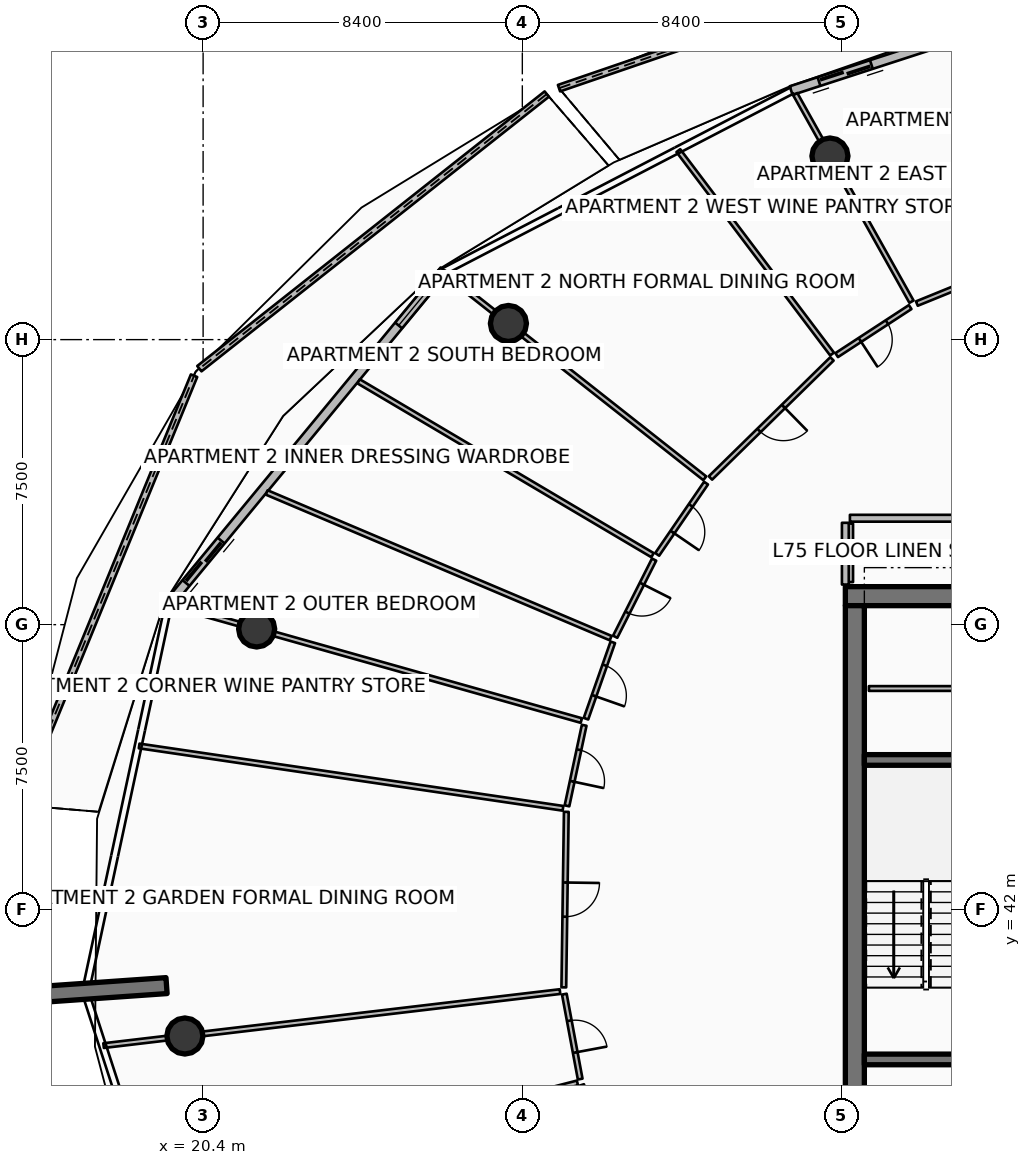
"""IFC4 building model, lengths in metres.
Left out: names, types, materials, properties, quantities, classifications, styles, units other than length and angle.
Written with IfcOpenShell. Run it as: python <this file> out.ifc"""

import sys

from ifc_helpers import new_model, si_unit, direction, frame, frame_2d, origin, origin_2d, place, context, subcontext, project, spatial, polyline, rectangle, circle, outline, extrude, element, fill, save


model = new_model("IFC4")
c1 = context("Model", 3, precision=1e-05, world=origin(), true_north=direction((0.0, 1.0)))
c2 = subcontext(c1, "Body", "Model", "MODEL_VIEW")
j1 = project(units=[si_unit("LENGTHUNIT", "METRE"), si_unit("PLANEANGLEUNIT", "RADIAN")], contexts=[c1])
p1 = place(None, origin())
s1 = spatial("IfcSite", under=j1, at=p1, CompositionType="ELEMENT")
p2 = place(p1, origin())
s2 = spatial("IfcBuilding", under=s1, at=p2, CompositionType="ELEMENT")
p3 = place(p2, frame((0.0, 0.0, 298.3)))
s3 = spatial("IfcBuildingStorey", under=s2, at=p3, CompositionType="ELEMENT", Elevation=298.3)
p4 = place(p3, frame((37.3, 50.25, 0.0), z_axis=(0.0, 0.0, 1.0), x_axis=(1.0, 0.0, 0.0)))
e1 = element("IfcWall", 1, at=p4, inside=s3, PredefinedType="SHEAR", context=c2, shape_type="SweptSolid", body=[
    extrude(rectangle(XDim=9.6, YDim=0.5, at=frame_2d((4.8, 0.0))), origin(), (0.0, 0.0, 1.0), 3.85),
])
p5 = place(p3, frame((37.55, 34.0, 0.0), z_axis=(0.0, 0.0, 1.0), x_axis=(0.0, 1.0, 0.0)))
e2 = element("IfcWall", 2, at=p5, inside=s3, PredefinedType="SHEAR", context=c2, shape_type="SweptSolid", body=[
    extrude(rectangle(XDim=16.0, YDim=0.5, at=frame_2d((8.0, 0.0))), origin(), (0.0, 0.0, 1.0), 3.85),
])
for number, where, z_axis, x_axis in (
    (3, (37.8, 38.06, 0.0), (0.0, 0.0, 1.0), (1.0, 0.0, 0.0)),
    (4, (37.8, 45.94, 0.0), (0.0, 0.0, 1.0), (1.0, 0.0, 0.0)),
):
    element("IfcWall", number, at=place(p3, frame(where, z_axis=z_axis, x_axis=x_axis)), inside=s3, PredefinedType="SHEAR", context=c2, shape_type="SweptSolid", body=[
        extrude(rectangle(XDim=3.5, YDim=0.28, at=frame_2d((1.75, 0.0))), origin(), (0.0, 0.0, 1.0), 3.85),
    ])
p6 = place(p3, frame((19.438, 40.003, 0.0), z_axis=(0.0, 0.0, 1.0), x_axis=(-0.997563824095, -0.069759707979, 0.0)))
e5 = element("IfcWall", 5, at=p6, inside=s3, PredefinedType="SOLIDWALL", context=c2, shape_type="SweptSolid", body=[
    extrude(rectangle(XDim=3.5, YDim=0.42, at=frame_2d((1.75, 0.0))), origin(), (0.0, 0.0, 1.0), 3.85),
])
for number, where, z_axis, x_axis in (
    (6, (36.895, 61.83, 0.0), (0.0, 0.0, 1.0), (1.0, 0.0, 0.0)),
    (7, (28.434, 57.425, 0.0), (0.0, 0.0, 1.0), (1.0, 0.0, 0.0)),
    (8, (21.809, 49.387, 0.0), (0.0, 0.0, 1.0), (1.0, 0.0, 0.0)),
    (9, (19.92, 38.677, 0.0), (0.0, 0.0, 1.0), (1.0, 0.0, 0.0)),
):
    element("IfcColumn", number, at=place(p3, frame(where, z_axis=z_axis, x_axis=x_axis)), inside=s3, PredefinedType="COLUMN", context=c2, shape_type="SweptSolid", body=[
        extrude(circle(Radius=0.475, at=origin_2d()), origin(), (0.0, 0.0, 1.0), 3.59),
    ])
p7 = place(p3, frame((39.74, 67.034, 0.0), z_axis=(0.0, 0.0, 1.0), x_axis=(-0.945994037051, -0.32418402469, 0.0)))
e10 = element("IfcWall", 10, at=p7, inside=s3, PredefinedType="PARAPET", context=c2, shape_type="SweptSolid", body=[
    extrude(outline(polyline([(0.0, 0.0), (10.544, 0.0), (10.544, 1.747), (5.272, 1.562), (0.0, 1.348), (0.0, 0.0)])), frame((0.0, 0.09, 0.0), z_axis=(0.0, -1.0, 0.0), x_axis=(1.0, 0.0, 0.0)), (0.0, 0.0, 1.0), 0.18),
])
p8 = place(p3, frame((29.443, 63.461, 0.0), z_axis=(0.0, 0.0, 1.0), x_axis=(-0.784536716277, -0.620082366153, 0.0)))
e11 = element("IfcWall", 11, at=p8, inside=s3, PredefinedType="PARAPET", context=c2, shape_type="SweptSolid", body=[
    extrude(outline(polyline([(0.0, 0.0), (11.652, 0.0), (11.652, 1.832), (5.826, 1.853), (0.0, 1.756), (0.0, 0.0)])), frame((0.0, 0.09, 0.0), z_axis=(0.0, -1.0, 0.0), x_axis=(1.0, 0.0, 0.0)), (0.0, 0.0, 1.0), 0.18),
])
p9 = place(p3, frame((20.162, 56.05, 0.0), z_axis=(0.0, 0.0, 1.0), x_axis=(-0.3796059491, -0.92514827104, 0.0)))
e12 = element("IfcWall", 12, at=p9, inside=s3, PredefinedType="PARAPET", context=c2, shape_type="SweptSolid", body=[
    extrude(outline(polyline([(0.0, 0.0), (12.209, 0.0), (12.208, 1.497), (6.104, 1.696), (0.0, 1.832), (0.0, 0.0)])), frame((0.0, 0.09, 0.0), z_axis=(0.0, -1.0, 0.0), x_axis=(1.0, 0.0, 0.0)), (0.0, 0.0, 1.0), 0.18),
])
p10 = place(p3, frame((45.142, 66.564, 0.0), z_axis=(0.0, 0.0, 1.0), x_axis=(-0.951055974609, -0.309018661507, 0.0)))
e13 = element("IfcWall", 13, at=p10, inside=s3, PredefinedType="SOLIDWALL", context=c2, shape_type="SweptSolid", body=[
    extrude(rectangle(XDim=9.745, YDim=0.24, at=frame_2d((4.873, 0.0))), origin(), (0.0, 0.0, 1.0), 2.54),
])
p11 = place(p10, frame((7.525, 0.0, 0.0)))
e14 = element("IfcOpeningElement", 14, at=p11, cuts=e13, PredefinedType="OPENING", context=c2, shape_type="SweptSolid", body=[
    extrude(rectangle(XDim=1.45, YDim=2.15, at=frame_2d((0.725, 1.075))), frame((0.0, 0.13, 0.0), z_axis=(0.0, -1.0, 0.0), x_axis=(1.0, 0.0, 0.0)), (0.0, 0.0, 1.0), 0.26),
])
p12 = place(p10, frame((0.28, 0.0, 0.65)))
e15 = element("IfcOpeningElement", 15, at=p12, cuts=e13, PredefinedType="OPENING", context=c2, shape_type="SweptSolid", body=[
    extrude(rectangle(XDim=1.6, YDim=1.5, at=frame_2d((0.8, 0.75))), frame((0.0, 0.13, 0.0), z_axis=(0.0, -1.0, 0.0), x_axis=(1.0, 0.0, 0.0)), (0.0, 0.0, 1.0), 0.26),
])
p13 = place(p3, frame((26.742, 58.822, 0.0), z_axis=(0.0, 0.0, 1.0), x_axis=(-0.636680093065, -0.771128043255, 0.0)))
e16 = element("IfcWall", 16, at=p13, inside=s3, PredefinedType="SOLIDWALL", context=c2, shape_type="SweptSolid", body=[
    extrude(rectangle(XDim=11.438, YDim=0.24, at=frame_2d((5.719, 0.0))), origin(), (0.0, 0.0, 1.0), 2.54),
])
p14 = place(p13, frame((9.218, 0.0, 0.0)))
e17 = element("IfcOpeningElement", 17, at=p14, cuts=e16, PredefinedType="OPENING", context=c2, shape_type="SweptSolid", body=[
    extrude(rectangle(XDim=1.45, YDim=2.15, at=frame_2d((0.725, 1.075))), frame((0.0, 0.13, 0.0), z_axis=(0.0, -1.0, 0.0), x_axis=(1.0, 0.0, 0.0)), (0.0, 0.0, 1.0), 0.26),
])
p15 = place(p13, frame((0.28, 0.0, 0.65)))
e18 = element("IfcOpeningElement", 18, at=p15, cuts=e16, PredefinedType="OPENING", context=c2, shape_type="SweptSolid", body=[
    extrude(rectangle(XDim=1.6, YDim=1.5, at=frame_2d((0.8, 0.75))), frame((0.0, 0.13, 0.0), z_axis=(0.0, -1.0, 0.0), x_axis=(1.0, 0.0, 0.0)), (0.0, 0.0, 1.0), 0.26),
])
p16 = place(p3, frame((37.92, 47.82, 0.0), z_axis=(0.0, 0.0, 1.0), x_axis=(1.0, 0.0, 0.0)))
e19 = element("IfcWall", 19, at=p16, inside=s3, PredefinedType="PARTITIONING", context=c2, shape_type="SweptSolid", body=[
    extrude(rectangle(XDim=8.78, YDim=0.125, at=frame_2d((4.39, 0.0))), origin(), (0.0, 0.0, 1.0), 3.03),
])
p17 = place(p16, frame((3.965, 0.0, 0.0)))
e20 = element("IfcOpeningElement", 20, at=p17, cuts=e19, PredefinedType="OPENING", context=c2, shape_type="SweptSolid", body=[
    extrude(rectangle(XDim=0.85, YDim=2.06, at=frame_2d((0.425, 1.03))), frame((0.0, 0.073, 0.0), z_axis=(0.0, -1.0, 0.0), x_axis=(1.0, 0.0, 0.0)), (0.0, 0.0, 1.0), 0.145),
])
p18 = place(p3, frame((37.44, 50.62, 0.0), z_axis=(0.0, 0.0, 1.0), x_axis=(0.0, 1.0, 0.0)))
e21 = element("IfcWall", 21, at=p18, inside=s3, PredefinedType="PARTITIONING", context=c2, shape_type="SweptSolid", body=[
    extrude(rectangle(XDim=1.54, YDim=0.125, at=frame_2d((0.77, 0.0))), origin(), (0.0, 0.0, 1.0), 3.03),
])
p19 = place(p3, frame((43.204, 59.584, 0.0), z_axis=(0.0, 0.0, 1.0), x_axis=(-0.926332321747, -0.376707352843, 0.0)))
e22 = element("IfcWall", 22, at=p19, inside=s3, PredefinedType="PARTITIONING", context=c2, shape_type="SweptSolid", body=[
    extrude(rectangle(XDim=4.342, YDim=0.125, at=frame_2d((2.171, 0.0))), origin(), (0.0, 0.0, 1.0), 2.957),
])
p20 = place(p19, frame((1.721, 0.0, 0.0)))
e23 = element("IfcOpeningElement", 23, at=p20, cuts=e22, PredefinedType="OPENING", context=c2, shape_type="SweptSolid", body=[
    extrude(rectangle(XDim=0.9, YDim=2.08, at=frame_2d((0.45, 1.04))), frame((0.0, 0.073, 0.0), z_axis=(0.0, -1.0, 0.0), x_axis=(1.0, 0.0, 0.0)), (0.0, 0.0, 1.0), 0.145),
])
p21 = place(p3, frame((42.112, 52.3, 0.0), z_axis=(0.0, 0.0, 1.0), x_axis=(-1.0, 0.0, 0.0)))
e24 = element("IfcWall", 24, at=p21, inside=s3, PredefinedType="PARTITIONING", context=c2, shape_type="SweptSolid", body=[
    extrude(rectangle(XDim=4.692, YDim=0.18, at=frame_2d((2.346, 0.0))), origin(), (0.0, 0.0, 1.0), 2.957),
])
p22 = place(p3, frame((37.3, 52.18, 0.0), z_axis=(0.0, 0.0, 1.0), x_axis=(0.0, -1.0, 0.0)))
e25 = element("IfcWall", 25, at=p22, inside=s3, PredefinedType="PARTITIONING", context=c2, shape_type="SweptSolid", body=[
    extrude(rectangle(XDim=1.625, YDim=0.18, at=frame_2d((0.812, 0.0))), origin(), (0.0, 0.0, 1.0), 2.957),
])
p23 = place(p3, frame((39.041, 57.998, 0.0), z_axis=(0.0, 0.0, 1.0), x_axis=(-0.488617622803, 0.872498033629, 0.0)))
e26 = element("IfcWall", 26, at=p23, inside=s3, PredefinedType="PARTITIONING", context=c2, shape_type="SweptSolid", body=[
    extrude(rectangle(XDim=6.259, YDim=0.125, at=frame_2d((3.129, 0.0))), origin(), (0.0, 0.0, 1.0), 2.957),
])
p24 = place(p3, frame((36.951, 56.62, 0.0), z_axis=(0.0, 0.0, 1.0), x_axis=(-0.602918531989, 0.797802759951, 0.0)))
e27 = element("IfcWall", 27, at=p24, inside=s3, PredefinedType="PARTITIONING", context=c2, shape_type="SweptSolid", body=[
    extrude(rectangle(XDim=6.71, YDim=0.125, at=frame_2d((3.355, 0.0))), origin(), (0.0, 0.0, 1.0), 3.03),
])
p25 = place(p3, frame((39.006, 57.856, 0.0), z_axis=(0.0, 0.0, 1.0), x_axis=(-0.837071991575, -0.547092753489, 0.0)))
e28 = element("IfcWall", 28, at=p25, inside=s3, PredefinedType="PARTITIONING", context=c2, shape_type="SweptSolid", body=[
    extrude(rectangle(XDim=2.31, YDim=0.125, at=frame_2d((1.155, 0.0))), origin(), (0.0, 0.0, 1.0), 2.957),
])
p26 = place(p25, frame((0.73, 0.0, 0.0)))
e29 = element("IfcOpeningElement", 29, at=p26, cuts=e28, PredefinedType="OPENING", context=c2, shape_type="SweptSolid", body=[
    extrude(rectangle(XDim=0.85, YDim=2.06, at=frame_2d((0.425, 1.03))), frame((0.0, 0.073, 0.0), z_axis=(0.0, -1.0, 0.0), x_axis=(1.0, 0.0, 0.0)), (0.0, 0.0, 1.0), 0.145),
])
p27 = place(p3, frame((36.948, 56.493, 0.0), z_axis=(0.0, 0.0, 1.0), x_axis=(-0.714296261594, -0.69984344726, 0.0)))
e30 = element("IfcWall", 30, at=p27, inside=s3, PredefinedType="PARTITIONING", context=c2, shape_type="SweptSolid", body=[
    extrude(rectangle(XDim=4.477, YDim=0.125, at=frame_2d((2.238, 0.0))), origin(), (0.0, 0.0, 1.0), 2.957),
])
p28 = place(p27, frame((1.788, 0.0, 0.0)))
e31 = element("IfcOpeningElement", 31, at=p28, cuts=e30, PredefinedType="OPENING", context=c2, shape_type="SweptSolid", body=[
    extrude(rectangle(XDim=0.9, YDim=2.08, at=frame_2d((0.45, 1.04))), frame((0.0, 0.073, 0.0), z_axis=(0.0, -1.0, 0.0), x_axis=(1.0, 0.0, 0.0)), (0.0, 0.0, 1.0), 0.145),
])
p29 = place(p3, frame((33.601, 53.352, 0.0), z_axis=(0.0, 0.0, 1.0), x_axis=(-0.785335435896, 0.619070475088, 0.0)))
e32 = element("IfcWall", 32, at=p29, inside=s3, PredefinedType="PARTITIONING", context=c2, shape_type="SweptSolid", body=[
    extrude(rectangle(XDim=8.749, YDim=0.125, at=frame_2d((4.374, 0.0))), origin(), (0.0, 0.0, 1.0), 2.957),
])
p30 = place(p3, frame((32.226, 51.329, 0.0), z_axis=(0.0, 0.0, 1.0), x_axis=(-0.860733895342, 0.50905516539, 0.0)))
e33 = element("IfcWall", 33, at=p30, inside=s3, PredefinedType="PARTITIONING", context=c2, shape_type="SweptSolid", body=[
    extrude(rectangle(XDim=8.985, YDim=0.125, at=frame_2d((4.493, 0.0))), origin(), (0.0, 0.0, 1.0), 3.03),
])
p31 = place(p3, frame((31.125, 49.146, 0.0), z_axis=(0.0, 0.0, 1.0), x_axis=(-0.920847570418, 0.389922751395, 0.0)))
e34 = element("IfcWall", 34, at=p31, inside=s3, PredefinedType="PARTITIONING", context=c2, shape_type="SweptSolid", body=[
    extrude(rectangle(XDim=9.83, YDim=0.125, at=frame_2d((4.915, 0.0))), origin(), (0.0, 0.0, 1.0), 3.03),
])
p32 = place(p3, frame((33.634, 53.224, 0.0), z_axis=(0.0, 0.0, 1.0), x_axis=(-0.565361367763, -0.824843332907, 0.0)))
e35 = element("IfcWall", 35, at=p32, inside=s3, PredefinedType="PARTITIONING", context=c2, shape_type="SweptSolid", body=[
    extrude(rectangle(XDim=2.273, YDim=0.125, at=frame_2d((1.137, 0.0))), origin(), (0.0, 0.0, 1.0), 2.957),
])
p33 = place(p32, frame((0.711, 0.0, 0.0)))
e36 = element("IfcOpeningElement", 36, at=p33, cuts=e35, PredefinedType="OPENING", context=c2, shape_type="SweptSolid", body=[
    extrude(rectangle(XDim=0.85, YDim=2.06, at=frame_2d((0.425, 1.03))), frame((0.0, 0.073, 0.0), z_axis=(0.0, -1.0, 0.0), x_axis=(1.0, 0.0, 0.0)), (0.0, 0.0, 1.0), 0.145),
])
p34 = place(p3, frame((32.268, 51.211, 0.0), z_axis=(0.0, 0.0, 1.0), x_axis=(-0.4505614742, -0.892745404898, 0.0)))
e37 = element("IfcWall", 37, at=p34, inside=s3, PredefinedType="PARTITIONING", context=c2, shape_type="SweptSolid", body=[
    extrude(rectangle(XDim=2.273, YDim=0.125, at=frame_2d((1.137, 0.0))), origin(), (0.0, 0.0, 1.0), 3.03),
])
p35 = place(p34, frame((0.712, 0.0, 0.0)))
e38 = element("IfcOpeningElement", 38, at=p35, cuts=e37, PredefinedType="OPENING", context=c2, shape_type="SweptSolid", body=[
    extrude(rectangle(XDim=0.85, YDim=2.06, at=frame_2d((0.425, 1.03))), frame((0.0, 0.073, 0.0), z_axis=(0.0, -1.0, 0.0), x_axis=(1.0, 0.0, 0.0)), (0.0, 0.0, 1.0), 0.145),
])
p36 = place(p3, frame((31.181, 49.035, 0.0), z_axis=(0.0, 0.0, 1.0), x_axis=(-0.331350883475, -0.943507600404, 0.0)))
e39 = element("IfcWall", 39, at=p36, inside=s3, PredefinedType="PARTITIONING", context=c2, shape_type="SweptSolid", body=[
    extrude(rectangle(XDim=2.13, YDim=0.125, at=frame_2d((1.065, 0.0))), origin(), (0.0, 0.0, 1.0), 2.957),
])
p37 = place(p36, frame((0.64, 0.0, 0.0)))
e40 = element("IfcOpeningElement", 40, at=p37, cuts=e39, PredefinedType="OPENING", context=c2, shape_type="SweptSolid", body=[
    extrude(rectangle(XDim=0.85, YDim=2.06, at=frame_2d((0.425, 1.03))), frame((0.0, 0.073, 0.0), z_axis=(0.0, -1.0, 0.0), x_axis=(1.0, 0.0, 0.0)), (0.0, 0.0, 1.0), 0.145),
])
p38 = place(p3, frame((30.353, 46.977, 0.0), z_axis=(0.0, 0.0, 1.0), x_axis=(-0.962452900165, 0.271448733583, 0.0)))
e41 = element("IfcWall", 41, at=p38, inside=s3, PredefinedType="PARTITIONING", context=c2, shape_type="SweptSolid", body=[
    extrude(rectangle(XDim=11.16, YDim=0.125, at=frame_2d((5.58, 0.0))), origin(), (0.0, 0.0, 1.0), 2.957),
])
p39 = place(p3, frame((29.869, 44.667, 0.0), z_axis=(0.0, 0.0, 1.0), x_axis=(-0.989345560315, 0.145586270938, 0.0)))
e42 = element("IfcWall", 42, at=p39, inside=s3, PredefinedType="PARTITIONING", context=c2, shape_type="SweptSolid", body=[
    extrude(rectangle(XDim=11.272, YDim=0.125, at=frame_2d((5.636, 0.0))), origin(), (0.0, 0.0, 1.0), 3.03),
])
p40 = place(p3, frame((30.428, 46.852, 0.0), z_axis=(0.0, 0.0, 1.0), x_axis=(-0.208944429957, -0.977927515305, 0.0)))
e43 = element("IfcWall", 43, at=p40, inside=s3, PredefinedType="PARTITIONING", context=c2, shape_type="SweptSolid", body=[
    extrude(rectangle(XDim=2.167, YDim=0.125, at=frame_2d((1.084, 0.0))), origin(), (0.0, 0.0, 1.0), 2.957),
])
p41 = place(p40, frame((0.659, 0.0, 0.0)))
e44 = element("IfcOpeningElement", 44, at=p41, cuts=e43, PredefinedType="OPENING", context=c2, shape_type="SweptSolid", body=[
    extrude(rectangle(XDim=0.85, YDim=2.06, at=frame_2d((0.425, 1.03))), frame((0.0, 0.073, 0.0), z_axis=(0.0, -1.0, 0.0), x_axis=(1.0, 0.0, 0.0)), (0.0, 0.0, 1.0), 0.145),
])
p42 = place(p3, frame((29.957, 44.574, 0.0), z_axis=(0.0, 0.0, 1.0), x_axis=(-0.014114375014, -0.999900387248, 0.0)))
e45 = element("IfcWall", 45, at=p42, inside=s3, PredefinedType="PARTITIONING", context=c2, shape_type="SweptSolid", body=[
    extrude(rectangle(XDim=4.618, YDim=0.125, at=frame_2d((2.309, 0.0))), origin(), (0.0, 0.0, 1.0), 2.957),
])
p43 = place(p42, frame((1.859, 0.0, 0.0)))
e46 = element("IfcOpeningElement", 46, at=p43, cuts=e45, PredefinedType="OPENING", context=c2, shape_type="SweptSolid", body=[
    extrude(rectangle(XDim=0.9, YDim=2.08, at=frame_2d((0.45, 1.04))), frame((0.0, 0.073, 0.0), z_axis=(0.0, -1.0, 0.0), x_axis=(1.0, 0.0, 0.0)), (0.0, 0.0, 1.0), 0.145),
])
p44 = place(p3, frame((29.791, 39.845, 0.0), z_axis=(0.0, 0.0, 1.0), x_axis=(-0.993069062241, -0.117532283306, 0.0)))
e47 = element("IfcWall", 47, at=p44, inside=s3, PredefinedType="PARTITIONING", context=c2, shape_type="SweptSolid", body=[
    extrude(rectangle(XDim=12.094, YDim=0.125, at=frame_2d((6.047, 0.0))), origin(), (0.0, 0.0, 1.0), 2.957),
])
p45 = place(p3, frame((30.25, 37.442, 0.0), z_axis=(0.0, 0.0, 1.0), x_axis=(-0.968584853299, -0.248683296503, 0.0)))
e48 = element("IfcWall", 48, at=p45, inside=s3, PredefinedType="PARTITIONING", context=c2, shape_type="SweptSolid", body=[
    extrude(rectangle(XDim=11.578, YDim=0.125, at=frame_2d((5.789, 0.0))), origin(), (0.0, 0.0, 1.0), 3.03),
])
p46 = place(p3, frame((29.905, 39.778, 0.0), z_axis=(0.0, 0.0, 1.0), x_axis=(0.183542776788, -0.98301172378, 0.0)))
e49 = element("IfcWall", 49, at=p46, inside=s3, PredefinedType="PARTITIONING", context=c2, shape_type="SweptSolid", body=[
    extrude(rectangle(XDim=2.273, YDim=0.125, at=frame_2d((1.137, 0.0))), origin(), (0.0, 0.0, 1.0), 2.957),
])
p47 = place(p46, frame((0.711, 0.0, 0.0)))
e50 = element("IfcOpeningElement", 50, at=p47, cuts=e49, PredefinedType="OPENING", context=c2, shape_type="SweptSolid", body=[
    extrude(rectangle(XDim=0.85, YDim=2.06, at=frame_2d((0.425, 1.03))), frame((0.0, 0.073, 0.0), z_axis=(0.0, -1.0, 0.0), x_axis=(1.0, 0.0, 0.0)), (0.0, 0.0, 1.0), 0.145),
])
p48 = place(p3, frame((30.362, 37.389, 0.0), z_axis=(0.0, 0.0, 1.0), x_axis=(0.309101621342, -0.951029015164, 0.0)))
e51 = element("IfcWall", 51, at=p48, inside=s3, PredefinedType="PARTITIONING", context=c2, shape_type="SweptSolid", body=[
    extrude(rectangle(XDim=2.13, YDim=0.125, at=frame_2d((1.065, 0.0))), origin(), (0.0, 0.0, 1.0), 3.03),
])
p49 = place(p48, frame((0.64, 0.0, 0.0)))
e52 = element("IfcOpeningElement", 52, at=p49, cuts=e51, PredefinedType="OPENING", context=c2, shape_type="SweptSolid", body=[
    extrude(rectangle(XDim=0.85, YDim=2.06, at=frame_2d((0.425, 1.03))), frame((0.0, 0.073, 0.0), z_axis=(0.0, -1.0, 0.0), x_axis=(1.0, 0.0, 0.0)), (0.0, 0.0, 1.0), 0.145),
])
p50 = place(p11, origin())
e53 = element("IfcDoor", 53, at=p50, inside=s3, OperationType="DOUBLE_DOOR_SLIDING", PredefinedType="DOOR", context=c2, shape_type="SweptSolid", body=[
    extrude(rectangle(XDim=1.45, YDim=2.15, at=frame_2d((0.725, 1.075))), frame((0.0, 0.025, 0.0), z_axis=(0.0, -1.0, 0.0), x_axis=(1.0, 0.0, 0.0)), (0.0, 0.0, 1.0), 0.05),
])
fill(e14, e53)
p51 = place(p14, origin())
e54 = element("IfcDoor", 54, at=p51, inside=s3, OperationType="DOUBLE_DOOR_SLIDING", PredefinedType="DOOR", context=c2, shape_type="SweptSolid", body=[
    extrude(rectangle(XDim=1.45, YDim=2.15, at=frame_2d((0.725, 1.075))), frame((0.0, 0.025, 0.0), z_axis=(0.0, -1.0, 0.0), x_axis=(1.0, 0.0, 0.0)), (0.0, 0.0, 1.0), 0.05),
])
fill(e17, e54)
p52 = place(p15, origin())
e55 = element("IfcWindow", 55, at=p52, inside=s3, PartitioningType="SINGLE_PANEL", PredefinedType="WINDOW", context=c2, shape_type="SweptSolid", body=[
    extrude(rectangle(XDim=1.6, YDim=1.5, at=frame_2d((0.8, 0.75))), frame((0.0, 0.03, 0.0), z_axis=(0.0, -1.0, 0.0), x_axis=(1.0, 0.0, 0.0)), (0.0, 0.0, 1.0), 0.06),
])
fill(e18, e55)
p53 = place(p26, origin())
e56 = element("IfcDoor", 56, at=p53, inside=s3, OperationType="SINGLE_SWING_RIGHT", PredefinedType="DOOR", context=c2, shape_type="SweptSolid", body=[
    extrude(rectangle(XDim=0.85, YDim=2.06, at=frame_2d((0.425, 1.03))), frame((0.0, 0.025, 0.0), z_axis=(0.0, -1.0, 0.0), x_axis=(1.0, 0.0, 0.0)), (0.0, 0.0, 1.0), 0.05),
])
fill(e29, e56)
p54 = place(p28, origin())
e57 = element("IfcDoor", 57, at=p54, inside=s3, OperationType="SINGLE_SWING_LEFT", PredefinedType="DOOR", context=c2, shape_type="SweptSolid", body=[
    extrude(rectangle(XDim=0.9, YDim=2.08, at=frame_2d((0.45, 1.04))), frame((0.0, 0.025, 0.0), z_axis=(0.0, -1.0, 0.0), x_axis=(1.0, 0.0, 0.0)), (0.0, 0.0, 1.0), 0.05),
])
fill(e31, e57)
p55 = place(p33, origin())
e58 = element("IfcDoor", 58, at=p55, inside=s3, OperationType="SINGLE_SWING_RIGHT", PredefinedType="DOOR", context=c2, shape_type="SweptSolid", body=[
    extrude(rectangle(XDim=0.85, YDim=2.06, at=frame_2d((0.425, 1.03))), frame((0.0, 0.025, 0.0), z_axis=(0.0, -1.0, 0.0), x_axis=(1.0, 0.0, 0.0)), (0.0, 0.0, 1.0), 0.05),
])
fill(e36, e58)
p56 = place(p35, origin())
e59 = element("IfcDoor", 59, at=p56, inside=s3, OperationType="SINGLE_SWING_LEFT", PredefinedType="DOOR", context=c2, shape_type="SweptSolid", body=[
    extrude(rectangle(XDim=0.85, YDim=2.06, at=frame_2d((0.425, 1.03))), frame((0.0, 0.025, 0.0), z_axis=(0.0, -1.0, 0.0), x_axis=(1.0, 0.0, 0.0)), (0.0, 0.0, 1.0), 0.05),
])
fill(e38, e59)
p57 = place(p37, origin())
e60 = element("IfcDoor", 60, at=p57, inside=s3, OperationType="SINGLE_SWING_RIGHT", PredefinedType="DOOR", context=c2, shape_type="SweptSolid", body=[
    extrude(rectangle(XDim=0.85, YDim=2.06, at=frame_2d((0.425, 1.03))), frame((0.0, 0.025, 0.0), z_axis=(0.0, -1.0, 0.0), x_axis=(1.0, 0.0, 0.0)), (0.0, 0.0, 1.0), 0.05),
])
fill(e40, e60)
p58 = place(p41, origin())
e61 = element("IfcDoor", 61, at=p58, inside=s3, OperationType="SINGLE_SWING_RIGHT", PredefinedType="DOOR", context=c2, shape_type="SweptSolid", body=[
    extrude(rectangle(XDim=0.85, YDim=2.06, at=frame_2d((0.425, 1.03))), frame((0.0, 0.025, 0.0), z_axis=(0.0, -1.0, 0.0), x_axis=(1.0, 0.0, 0.0)), (0.0, 0.0, 1.0), 0.05),
])
fill(e44, e61)
p59 = place(p43, origin())
e62 = element("IfcDoor", 62, at=p59, inside=s3, OperationType="SINGLE_SWING_LEFT", PredefinedType="DOOR", context=c2, shape_type="SweptSolid", body=[
    extrude(rectangle(XDim=0.9, YDim=2.08, at=frame_2d((0.45, 1.04))), frame((0.0, 0.025, 0.0), z_axis=(0.0, -1.0, 0.0), x_axis=(1.0, 0.0, 0.0)), (0.0, 0.0, 1.0), 0.05),
])
fill(e46, e62)
p60 = place(p47, origin())
e63 = element("IfcDoor", 63, at=p60, inside=s3, OperationType="SINGLE_SWING_RIGHT", PredefinedType="DOOR", context=c2, shape_type="SweptSolid", body=[
    extrude(rectangle(XDim=0.85, YDim=2.06, at=frame_2d((0.425, 1.03))), frame((0.0, 0.025, 0.0), z_axis=(0.0, -1.0, 0.0), x_axis=(1.0, 0.0, 0.0)), (0.0, 0.0, 1.0), 0.05),
])
fill(e50, e63)
save(model, sys.argv[1])
